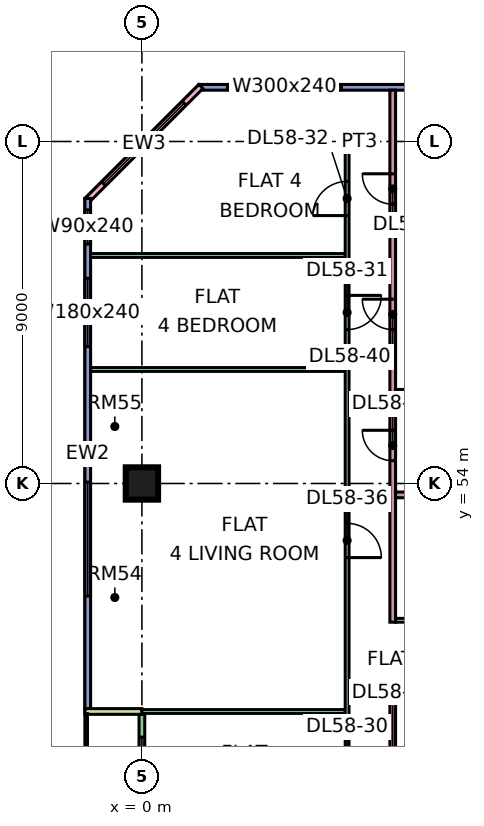
"""IFC4 building model, lengths in metres.
Left out: names, types, materials, properties, quantities, classifications, styles, units other than length and angle.
Written with IfcOpenShell. Run it as: python <this file> out.ifc"""

import sys

from ifc_helpers import new_model, si_unit, direction, frame, frame_2d, origin, origin_2d, place, context, subcontext, project, spatial, rectangle, extrude, element, fill, save


model = new_model("IFC4")
c1 = context("Model", 3, precision=1e-05, world=origin(), true_north=direction((0.0, 1.0)))
c2 = subcontext(c1, "Body", "Model", "MODEL_VIEW")
j1 = project(units=[si_unit("LENGTHUNIT", "METRE"), si_unit("PLANEANGLEUNIT", "RADIAN")], contexts=[c1])
p1 = place(None, origin())
s1 = spatial("IfcSite", under=j1, at=p1, CompositionType="ELEMENT")
p2 = place(p1, origin())
s2 = spatial("IfcBuilding", under=s1, at=p2, CompositionType="ELEMENT")
p3 = place(p2, frame((0.0, 0.0, 245.4)))
s3 = spatial("IfcBuildingStorey", under=s2, at=p3, CompositionType="ELEMENT", Elevation=245.4)
p4 = place(p3, frame((0.0, 54.0, 0.0), z_axis=(0.0, 0.0, 1.0), x_axis=(1.0, 0.0, 0.0)))
e1 = element("IfcColumn", 1, at=p4, inside=s3, PredefinedType="COLUMN", context=c2, shape_type="SweptSolid", body=[
    extrude(rectangle(XDim=0.85, YDim=0.85, at=origin_2d()), origin(), (0.0, 0.0, 1.0), 3.75),
])
p5 = place(p3, frame((11.925, 64.425, 0.0), z_axis=(0.0, 0.0, 1.0), x_axis=(-1.0, 0.0, 0.0)))
e2 = element("IfcWall", 2, at=p5, inside=s3, PredefinedType="SOLIDWALL", context=c2, shape_type="SweptSolid", body=[
    extrude(rectangle(XDim=10.425, YDim=0.15, at=frame_2d((5.212, 0.0))), origin(), (0.0, 0.0, 1.0), 3.35),
])
p6 = place(p5, frame((6.675, 0.0, 0.45)))
e3 = element("IfcOpeningElement", 3, at=p6, cuts=e2, PredefinedType="OPENING", context=c2, shape_type="SweptSolid", body=[
    extrude(rectangle(XDim=3.0, YDim=2.4, at=frame_2d((1.5, 1.2))), frame((0.0, 0.085, 0.0), z_axis=(0.0, -1.0, 0.0), x_axis=(1.0, 0.0, 0.0)), (0.0, 0.0, 1.0), 0.17),
])
p7 = place(p3, frame((1.553, 64.447, 0.0), z_axis=(0.0, 0.0, 1.0), x_axis=(-0.707106781187, -0.707106781187, 0.0)))
e4 = element("IfcWall", 4, at=p7, inside=s3, PredefinedType="SOLIDWALL", context=c2, shape_type="SweptSolid", body=[
    extrude(rectangle(XDim=4.243, YDim=0.15, at=frame_2d((2.121, 0.0))), origin(), (0.0, 0.0, 1.0), 3.35),
])
p8 = place(p7, frame((0.621, 0.0, 0.45)))
e5 = element("IfcOpeningElement", 5, at=p8, cuts=e4, PredefinedType="OPENING", context=c2, shape_type="SweptSolid", body=[
    extrude(rectangle(XDim=3.0, YDim=2.4, at=frame_2d((1.5, 1.2))), frame((0.0, 0.085, 0.0), z_axis=(0.0, -1.0, 0.0), x_axis=(1.0, 0.0, 0.0)), (0.0, 0.0, 1.0), 0.17),
])
p9 = place(p3, frame((-1.425, 61.5, 0.0), z_axis=(0.0, 0.0, 1.0), x_axis=(0.0, -1.0, 0.0)))
e6 = element("IfcWall", 6, at=p9, inside=s3, PredefinedType="SOLIDWALL", context=c2, shape_type="SweptSolid", body=[
    extrude(rectangle(XDim=13.425, YDim=0.15, at=frame_2d((6.712, 0.0))), origin(), (0.0, 0.0, 1.0), 3.35),
])
p10 = place(p9, frame((0.3, 0.0, 0.45)))
e7 = element("IfcOpeningElement", 7, at=p10, cuts=e6, PredefinedType="OPENING", context=c2, shape_type="SweptSolid", body=[
    extrude(rectangle(XDim=0.9, YDim=2.4, at=frame_2d((0.45, 1.2))), frame((0.0, 0.085, 0.0), z_axis=(0.0, -1.0, 0.0), x_axis=(1.0, 0.0, 0.0)), (0.0, 0.0, 1.0), 0.17),
])
p11 = place(p9, frame((2.1, 0.0, 0.45)))
e8 = element("IfcOpeningElement", 8, at=p11, cuts=e6, PredefinedType="OPENING", context=c2, shape_type="SweptSolid", body=[
    extrude(rectangle(XDim=1.8, YDim=2.4, at=frame_2d((0.9, 1.2))), frame((0.0, 0.085, 0.0), z_axis=(0.0, -1.0, 0.0), x_axis=(1.0, 0.0, 0.0)), (0.0, 0.0, 1.0), 0.17),
])
p12 = place(p9, frame((7.462, 0.0, 0.45)))
e9 = element("IfcOpeningElement", 9, at=p12, cuts=e6, PredefinedType="OPENING", context=c2, shape_type="SweptSolid", body=[
    extrude(rectangle(XDim=3.0, YDim=2.4, at=frame_2d((1.5, 1.2))), frame((0.0, 0.085, 0.0), z_axis=(0.0, -1.0, 0.0), x_axis=(1.0, 0.0, 0.0)), (0.0, 0.0, 1.0), 0.17),
])
p13 = place(p3, frame((0.0, 47.925, 0.0), z_axis=(0.0, 0.0, 1.0), x_axis=(0.0, -1.0, 0.0)))
e10 = element("IfcWall", 10, at=p13, inside=s3, PredefinedType="SOLIDWALL", context=c2, shape_type="SweptSolid", body=[
    extrude(rectangle(XDim=11.85, YDim=0.15, at=frame_2d((5.925, 0.0))), origin(), (0.0, 0.0, 1.0), 3.35),
])
p14 = place(p13, frame((0.6, 0.0, 0.45)))
e11 = element("IfcOpeningElement", 11, at=p14, cuts=e10, PredefinedType="OPENING", context=c2, shape_type="SweptSolid", body=[
    extrude(rectangle(XDim=1.2, YDim=2.4, at=frame_2d((0.6, 1.2))), frame((0.0, 0.085, 0.0), z_axis=(0.0, -1.0, 0.0), x_axis=(1.0, 0.0, 0.0)), (0.0, 0.0, 1.0), 0.17),
])
p15 = place(p13, frame((4.087, 0.0, 0.0)))
e12 = element("IfcOpeningElement", 12, at=p15, cuts=e10, PredefinedType="OPENING", context=c2, shape_type="SweptSolid", body=[
    extrude(rectangle(XDim=1.2, YDim=2.4, at=frame_2d((0.6, 1.2))), frame((0.0, 0.085, 0.0), z_axis=(0.0, -1.0, 0.0), x_axis=(1.0, 0.0, 0.0)), (0.0, 0.0, 1.0), 0.17),
])
p16 = place(p13, frame((6.525, 0.0, 0.45)))
e13 = element("IfcOpeningElement", 13, at=p16, cuts=e10, PredefinedType="OPENING", context=c2, shape_type="SweptSolid", body=[
    extrude(rectangle(XDim=1.8, YDim=2.4, at=frame_2d((0.9, 1.2))), frame((0.0, 0.085, 0.0), z_axis=(0.0, -1.0, 0.0), x_axis=(1.0, 0.0, 0.0)), (0.0, 0.0, 1.0), 0.17),
])
p17 = place(p13, frame((9.562, 0.0, 0.45)))
e14 = element("IfcOpeningElement", 14, at=p17, cuts=e10, PredefinedType="OPENING", context=c2, shape_type="SweptSolid", body=[
    extrude(rectangle(XDim=1.2, YDim=2.4, at=frame_2d((0.6, 1.2))), frame((0.0, 0.085, 0.0), z_axis=(0.0, -1.0, 0.0), x_axis=(1.0, 0.0, 0.0)), (0.0, 0.0, 1.0), 0.17),
])
p18 = place(p3, frame((-1.5, 48.0, 0.0), z_axis=(0.0, 0.0, 1.0), x_axis=(1.0, 0.0, 0.0)))
e15 = element("IfcWall", 15, at=p18, inside=s3, PredefinedType="SOLIDWALL", context=c2, shape_type="SweptSolid", body=[
    extrude(rectangle(XDim=1.5, YDim=0.15, at=frame_2d((0.75, 0.0))), origin(), (0.0, 0.0, 1.0), 3.35),
])
p19 = place(p3, frame((-1.351, 60.0, 0.0), z_axis=(0.0, 0.0, 1.0), x_axis=(1.0, 0.0, 0.0)))
e16 = element("IfcWall", 16, at=p19, inside=s3, PredefinedType="PARTITIONING", context=c2, shape_type="SweptSolid", body=[
    extrude(rectangle(XDim=6.701, YDim=0.1, at=frame_2d((3.351, 0.0))), origin(), (0.0, 0.0, 1.0), 3.35),
])
p20 = place(p3, frame((0.0, 48.0, 0.0), z_axis=(0.0, 0.0, 1.0), x_axis=(1.0, 0.0, 0.0)))
e17 = element("IfcWall", 17, at=p20, inside=s3, PredefinedType="PARTITIONING", context=c2, shape_type="SweptSolid", body=[
    extrude(rectangle(XDim=5.35, YDim=0.1, at=frame_2d((2.675, 0.0))), origin(), (0.0, 0.0, 1.0), 3.35),
])
p21 = place(p3, frame((-1.35, 57.0, 0.0), z_axis=(0.0, 0.0, 1.0), x_axis=(1.0, 0.0, 0.0)))
e18 = element("IfcWall", 18, at=p21, inside=s3, PredefinedType="PARTITIONING", context=c2, shape_type="SweptSolid", body=[
    extrude(rectangle(XDim=6.7, YDim=0.1, at=frame_2d((3.35, 0.0))), origin(), (0.0, 0.0, 1.0), 3.35),
])
p22 = place(p3, frame((5.4, 36.1, 0.0), z_axis=(0.0, 0.0, 1.0), x_axis=(0.0, 1.0, 0.0)))
e19 = element("IfcWall", 19, at=p22, inside=s3, PredefinedType="PARTITIONING", context=c2, shape_type="SweptSolid", body=[
    extrude(rectangle(XDim=26.95, YDim=0.1, at=frame_2d((13.475, 0.0))), origin(), (0.0, 0.0, 1.0), 3.35),
])
p23 = place(p22, frame((0.95, 0.0, 0.0)))
e20 = element("IfcOpeningElement", 20, at=p23, cuts=e19, PredefinedType="OPENING", context=c2, shape_type="SweptSolid", body=[
    extrude(rectangle(XDim=0.9, YDim=2.1, at=frame_2d((0.45, 1.05))), frame((0.0, 0.06, 0.0), z_axis=(0.0, -1.0, 0.0), x_axis=(1.0, 0.0, 0.0)), (0.0, 0.0, 1.0), 0.12),
])
p24 = place(p22, frame((3.95, 0.0, 0.0)))
e21 = element("IfcOpeningElement", 21, at=p24, cuts=e19, PredefinedType="OPENING", context=c2, shape_type="SweptSolid", body=[
    extrude(rectangle(XDim=0.9, YDim=2.1, at=frame_2d((0.45, 1.05))), frame((0.0, 0.06, 0.0), z_axis=(0.0, -1.0, 0.0), x_axis=(1.0, 0.0, 0.0)), (0.0, 0.0, 1.0), 0.12),
])
p25 = place(p22, frame((6.95, 0.0, 0.0)))
e22 = element("IfcOpeningElement", 22, at=p25, cuts=e19, PredefinedType="OPENING", context=c2, shape_type="SweptSolid", body=[
    extrude(rectangle(XDim=0.9, YDim=2.1, at=frame_2d((0.45, 1.05))), frame((0.0, 0.06, 0.0), z_axis=(0.0, -1.0, 0.0), x_axis=(1.0, 0.0, 0.0)), (0.0, 0.0, 1.0), 0.12),
])
p26 = place(p22, frame((9.95, 0.0, 0.0)))
e23 = element("IfcOpeningElement", 23, at=p26, cuts=e19, PredefinedType="OPENING", context=c2, shape_type="SweptSolid", body=[
    extrude(rectangle(XDim=0.9, YDim=2.1, at=frame_2d((0.45, 1.05))), frame((0.0, 0.06, 0.0), z_axis=(0.0, -1.0, 0.0), x_axis=(1.0, 0.0, 0.0)), (0.0, 0.0, 1.0), 0.12),
])
p27 = place(p22, frame((21.95, 0.0, 0.0)))
e24 = element("IfcOpeningElement", 24, at=p27, cuts=e19, PredefinedType="OPENING", context=c2, shape_type="SweptSolid", body=[
    extrude(rectangle(XDim=0.9, YDim=2.1, at=frame_2d((0.45, 1.05))), frame((0.0, 0.06, 0.0), z_axis=(0.0, -1.0, 0.0), x_axis=(1.0, 0.0, 0.0)), (0.0, 0.0, 1.0), 0.12),
])
p28 = place(p22, frame((24.95, 0.0, 0.0)))
e25 = element("IfcOpeningElement", 25, at=p28, cuts=e19, PredefinedType="OPENING", context=c2, shape_type="SweptSolid", body=[
    extrude(rectangle(XDim=0.9, YDim=2.1, at=frame_2d((0.45, 1.05))), frame((0.0, 0.06, 0.0), z_axis=(0.0, -1.0, 0.0), x_axis=(1.0, 0.0, 0.0)), (0.0, 0.0, 1.0), 0.12),
])
p29 = place(p22, frame((15.95, 0.0, 0.0)))
e26 = element("IfcOpeningElement", 26, at=p29, cuts=e19, PredefinedType="OPENING", context=c2, shape_type="SweptSolid", body=[
    extrude(rectangle(XDim=0.9, YDim=2.1, at=frame_2d((0.45, 1.05))), frame((0.0, 0.06, 0.0), z_axis=(0.0, -1.0, 0.0), x_axis=(1.0, 0.0, 0.0)), (0.0, 0.0, 1.0), 0.12),
])
p30 = place(p3, frame((5.45, 63.0, 0.0), z_axis=(0.0, 0.0, 1.0), x_axis=(1.0, 0.0, 0.0)))
e27 = element("IfcWall", 27, at=p30, inside=s3, PredefinedType="PARTITIONING", context=c2, shape_type="SweptSolid", body=[
    extrude(rectangle(XDim=0.55, YDim=0.1, at=frame_2d((0.275, 0.0))), origin(), (0.0, 0.0, 1.0), 3.35),
])
p31 = place(p3, frame((6.6, 36.1, 0.0), z_axis=(0.0, 0.0, 1.0), x_axis=(0.0, 1.0, 0.0)))
e28 = element("IfcWall", 28, at=p31, inside=s3, PredefinedType="PARTITIONING", context=c2, shape_type="SweptSolid", body=[
    extrude(rectangle(XDim=12.275, YDim=0.15, at=frame_2d((6.137, 0.0))), origin(), (0.0, 0.0, 1.0), 3.35),
])
p32 = place(p31, frame((6.95, 0.0, 0.0)))
e29 = element("IfcOpeningElement", 29, at=p32, cuts=e28, PredefinedType="OPENING", context=c2, shape_type="SweptSolid", body=[
    extrude(rectangle(XDim=0.8, YDim=2.1, at=frame_2d((0.4, 1.05))), frame((0.0, 0.085, 0.0), z_axis=(0.0, -1.0, 0.0), x_axis=(1.0, 0.0, 0.0)), (0.0, 0.0, 1.0), 0.17),
])
p33 = place(p31, frame((2.75, 0.0, 0.0)))
e30 = element("IfcOpeningElement", 30, at=p33, cuts=e28, PredefinedType="OPENING", context=c2, shape_type="SweptSolid", body=[
    extrude(rectangle(XDim=0.9, YDim=2.1, at=frame_2d((0.45, 1.05))), frame((0.0, 0.085, 0.0), z_axis=(0.0, -1.0, 0.0), x_axis=(1.0, 0.0, 0.0)), (0.0, 0.0, 1.0), 0.17),
])
p34 = place(p31, frame((9.8, 0.0, 0.0)))
e31 = element("IfcOpeningElement", 31, at=p34, cuts=e28, PredefinedType="OPENING", context=c2, shape_type="SweptSolid", body=[
    extrude(rectangle(XDim=0.8, YDim=2.1, at=frame_2d((0.4, 1.05))), frame((0.0, 0.085, 0.0), z_axis=(0.0, -1.0, 0.0), x_axis=(1.0, 0.0, 0.0)), (0.0, 0.0, 1.0), 0.17),
])
p35 = place(p3, frame((6.6, 50.35, 0.0), z_axis=(0.0, 0.0, 1.0), x_axis=(0.0, 1.0, 0.0)))
e32 = element("IfcWall", 32, at=p35, inside=s3, PredefinedType="PARTITIONING", context=c2, shape_type="SweptSolid", body=[
    extrude(rectangle(XDim=14.0, YDim=0.15, at=frame_2d((7.0, 0.0))), origin(), (0.0, 0.0, 1.0), 3.35),
])
p36 = place(p35, frame((11.0, 0.0, 0.0)))
e33 = element("IfcOpeningElement", 33, at=p36, cuts=e32, PredefinedType="OPENING", context=c2, shape_type="SweptSolid", body=[
    extrude(rectangle(XDim=0.8, YDim=2.1, at=frame_2d((0.4, 1.05))), frame((0.0, 0.085, 0.0), z_axis=(0.0, -1.0, 0.0), x_axis=(1.0, 0.0, 0.0)), (0.0, 0.0, 1.0), 0.17),
])
p37 = place(p35, frame((4.25, 0.0, 0.0)))
e34 = element("IfcOpeningElement", 34, at=p37, cuts=e32, PredefinedType="OPENING", context=c2, shape_type="SweptSolid", body=[
    extrude(rectangle(XDim=0.8, YDim=2.1, at=frame_2d((0.4, 1.05))), frame((0.0, 0.085, 0.0), z_axis=(0.0, -1.0, 0.0), x_axis=(1.0, 0.0, 0.0)), (0.0, 0.0, 1.0), 0.17),
])
p38 = place(p35, frame((7.7, 0.0, 0.0)))
e35 = element("IfcOpeningElement", 35, at=p38, cuts=e32, PredefinedType="OPENING", context=c2, shape_type="SweptSolid", body=[
    extrude(rectangle(XDim=0.8, YDim=2.1, at=frame_2d((0.4, 1.05))), frame((0.0, 0.085, 0.0), z_axis=(0.0, -1.0, 0.0), x_axis=(1.0, 0.0, 0.0)), (0.0, 0.0, 1.0), 0.17),
])
p39 = place(p3, frame((6.675, 48.3, 0.0), z_axis=(0.0, 0.0, 1.0), x_axis=(1.0, 0.0, 0.0)))
e36 = element("IfcWall", 36, at=p39, inside=s3, PredefinedType="PARTITIONING", context=c2, shape_type="SweptSolid", body=[
    extrude(rectangle(XDim=2.825, YDim=0.15, at=frame_2d((1.413, 0.0))), origin(), (0.0, 0.0, 1.0), 3.35),
])
p40 = place(p3, frame((6.675, 50.4, 0.0), z_axis=(0.0, 0.0, 1.0), x_axis=(1.0, 0.0, 0.0)))
e37 = element("IfcWall", 37, at=p40, inside=s3, PredefinedType="PARTITIONING", context=c2, shape_type="SweptSolid", body=[
    extrude(rectangle(XDim=2.825, YDim=0.1, at=frame_2d((1.413, 0.0))), origin(), (0.0, 0.0, 1.0), 3.35),
])
p41 = place(p40, frame((0.975, 0.0, 0.0)))
e38 = element("IfcOpeningElement", 38, at=p41, cuts=e37, PredefinedType="OPENING", context=c2, shape_type="SweptSolid", body=[
    extrude(rectangle(XDim=0.9, YDim=2.1, at=frame_2d((0.45, 1.05))), frame((0.0, 0.06, 0.0), z_axis=(0.0, -1.0, 0.0), x_axis=(1.0, 0.0, 0.0)), (0.0, 0.0, 1.0), 0.12),
])
for number, where, z_axis, x_axis in (
    (39, (6.675, 53.7, 0.0), (0.0, 0.0, 1.0), (1.0, 0.0, 0.0)),
    (40, (6.675, 56.4, 0.0), (0.0, 0.0, 1.0), (1.0, 0.0, 0.0)),
    (41, (6.675, 60.6, 0.0), (0.0, 0.0, 1.0), (1.0, 0.0, 0.0)),
):
    element("IfcWall", number, at=place(p3, frame(where, z_axis=z_axis, x_axis=x_axis)), inside=s3, PredefinedType="PARTITIONING", context=c2, shape_type="SweptSolid", body=[
        extrude(rectangle(XDim=2.825, YDim=0.15, at=frame_2d((1.413, 0.0))), origin(), (0.0, 0.0, 1.0), 3.35),
    ])
p42 = place(p6, origin())
e42 = element("IfcWindow", 42, at=p42, inside=s3, PartitioningType="SINGLE_PANEL", PredefinedType="WINDOW", context=c2, shape_type="SweptSolid", body=[
    extrude(rectangle(XDim=3.0, YDim=2.4, at=frame_2d((1.5, 1.2))), frame((0.0, 0.03, 0.0), z_axis=(0.0, -1.0, 0.0), x_axis=(1.0, 0.0, 0.0)), (0.0, 0.0, 1.0), 0.06),
])
fill(e3, e42)
p43 = place(p8, origin())
e43 = element("IfcWindow", 43, at=p43, inside=s3, PartitioningType="SINGLE_PANEL", PredefinedType="WINDOW", context=c2, shape_type="SweptSolid", body=[
    extrude(rectangle(XDim=3.0, YDim=2.4, at=frame_2d((1.5, 1.2))), frame((0.0, 0.03, 0.0), z_axis=(0.0, -1.0, 0.0), x_axis=(1.0, 0.0, 0.0)), (0.0, 0.0, 1.0), 0.06),
])
fill(e5, e43)
p44 = place(p10, origin())
e44 = element("IfcWindow", 44, at=p44, inside=s3, PartitioningType="SINGLE_PANEL", PredefinedType="WINDOW", context=c2, shape_type="SweptSolid", body=[
    extrude(rectangle(XDim=0.9, YDim=2.4, at=frame_2d((0.45, 1.2))), frame((0.0, 0.03, 0.0), z_axis=(0.0, -1.0, 0.0), x_axis=(1.0, 0.0, 0.0)), (0.0, 0.0, 1.0), 0.06),
])
fill(e7, e44)
p45 = place(p11, origin())
e45 = element("IfcWindow", 45, at=p45, inside=s3, PartitioningType="SINGLE_PANEL", PredefinedType="WINDOW", context=c2, shape_type="SweptSolid", body=[
    extrude(rectangle(XDim=1.8, YDim=2.4, at=frame_2d((0.9, 1.2))), frame((0.0, 0.03, 0.0), z_axis=(0.0, -1.0, 0.0), x_axis=(1.0, 0.0, 0.0)), (0.0, 0.0, 1.0), 0.06),
])
fill(e8, e45)
p46 = place(p12, origin())
e46 = element("IfcWindow", 46, at=p46, inside=s3, PartitioningType="SINGLE_PANEL", PredefinedType="WINDOW", context=c2, shape_type="SweptSolid", body=[
    extrude(rectangle(XDim=3.0, YDim=2.4, at=frame_2d((1.5, 1.2))), frame((0.0, 0.03, 0.0), z_axis=(0.0, -1.0, 0.0), x_axis=(1.0, 0.0, 0.0)), (0.0, 0.0, 1.0), 0.06),
])
fill(e9, e46)
p47 = place(p14, origin())
e47 = element("IfcWindow", 47, at=p47, inside=s3, PartitioningType="SINGLE_PANEL", PredefinedType="WINDOW", context=c2, shape_type="SweptSolid", body=[
    extrude(rectangle(XDim=1.2, YDim=2.4, at=frame_2d((0.6, 1.2))), frame((0.0, 0.03, 0.0), z_axis=(0.0, -1.0, 0.0), x_axis=(1.0, 0.0, 0.0)), (0.0, 0.0, 1.0), 0.06),
])
fill(e11, e47)
p48 = place(p27, origin())
e48 = element("IfcDoor", 48, at=p48, inside=s3, OperationType="SINGLE_SWING_RIGHT", PredefinedType="DOOR", context=c2, shape_type="SweptSolid", body=[
    extrude(rectangle(XDim=0.9, YDim=2.1, at=frame_2d((0.45, 1.05))), frame((0.0, 0.025, 0.0), z_axis=(0.0, -1.0, 0.0), x_axis=(1.0, 0.0, 0.0)), (0.0, 0.0, 1.0), 0.05),
])
fill(e24, e48)
p49 = place(p28, origin())
e49 = element("IfcDoor", 49, at=p49, inside=s3, OperationType="SINGLE_SWING_LEFT", PredefinedType="DOOR", context=c2, shape_type="SweptSolid", body=[
    extrude(rectangle(XDim=0.9, YDim=2.1, at=frame_2d((0.45, 1.05))), frame((0.0, 0.025, 0.0), z_axis=(0.0, -1.0, 0.0), x_axis=(1.0, 0.0, 0.0)), (0.0, 0.0, 1.0), 0.05),
])
fill(e25, e49)
p50 = place(p36, frame((0.8, 0.0, 0.0), z_axis=(0.0, 0.0, 1.0), x_axis=(-1.0, 0.0, 0.0)))
e50 = element("IfcDoor", 50, at=p50, inside=s3, OperationType="SINGLE_SWING_RIGHT", PredefinedType="DOOR", context=c2, shape_type="SweptSolid", body=[
    extrude(rectangle(XDim=0.8, YDim=2.1, at=frame_2d((0.4, 1.05))), frame((0.0, 0.025, 0.0), z_axis=(0.0, -1.0, 0.0), x_axis=(1.0, 0.0, 0.0)), (0.0, 0.0, 1.0), 0.05),
])
fill(e33, e50)
p51 = place(p29, frame((0.9, 0.0, 0.0), z_axis=(0.0, 0.0, 1.0), x_axis=(-1.0, 0.0, 0.0)))
e51 = element("IfcDoor", 51, at=p51, inside=s3, OperationType="SINGLE_SWING_LEFT", PredefinedType="DOOR", context=c2, shape_type="SweptSolid", body=[
    extrude(rectangle(XDim=0.9, YDim=2.1, at=frame_2d((0.45, 1.05))), frame((0.0, 0.025, 0.0), z_axis=(0.0, -1.0, 0.0), x_axis=(1.0, 0.0, 0.0)), (0.0, 0.0, 1.0), 0.05),
])
fill(e26, e51)
p52 = place(p37, frame((0.8, 0.0, 0.0), z_axis=(0.0, 0.0, 1.0), x_axis=(-1.0, 0.0, 0.0)))
e52 = element("IfcDoor", 52, at=p52, inside=s3, OperationType="SINGLE_SWING_RIGHT", PredefinedType="DOOR", context=c2, shape_type="SweptSolid", body=[
    extrude(rectangle(XDim=0.8, YDim=2.1, at=frame_2d((0.4, 1.05))), frame((0.0, 0.025, 0.0), z_axis=(0.0, -1.0, 0.0), x_axis=(1.0, 0.0, 0.0)), (0.0, 0.0, 1.0), 0.05),
])
fill(e34, e52)
p53 = place(p38, frame((0.8, 0.0, 0.0), z_axis=(0.0, 0.0, 1.0), x_axis=(-1.0, 0.0, 0.0)))
e53 = element("IfcDoor", 53, at=p53, inside=s3, OperationType="SINGLE_SWING_RIGHT", PredefinedType="DOOR", context=c2, shape_type="SweptSolid", body=[
    extrude(rectangle(XDim=0.8, YDim=2.1, at=frame_2d((0.4, 1.05))), frame((0.0, 0.025, 0.0), z_axis=(0.0, -1.0, 0.0), x_axis=(1.0, 0.0, 0.0)), (0.0, 0.0, 1.0), 0.05),
])
fill(e35, e53)
save(model, sys.argv[1])
